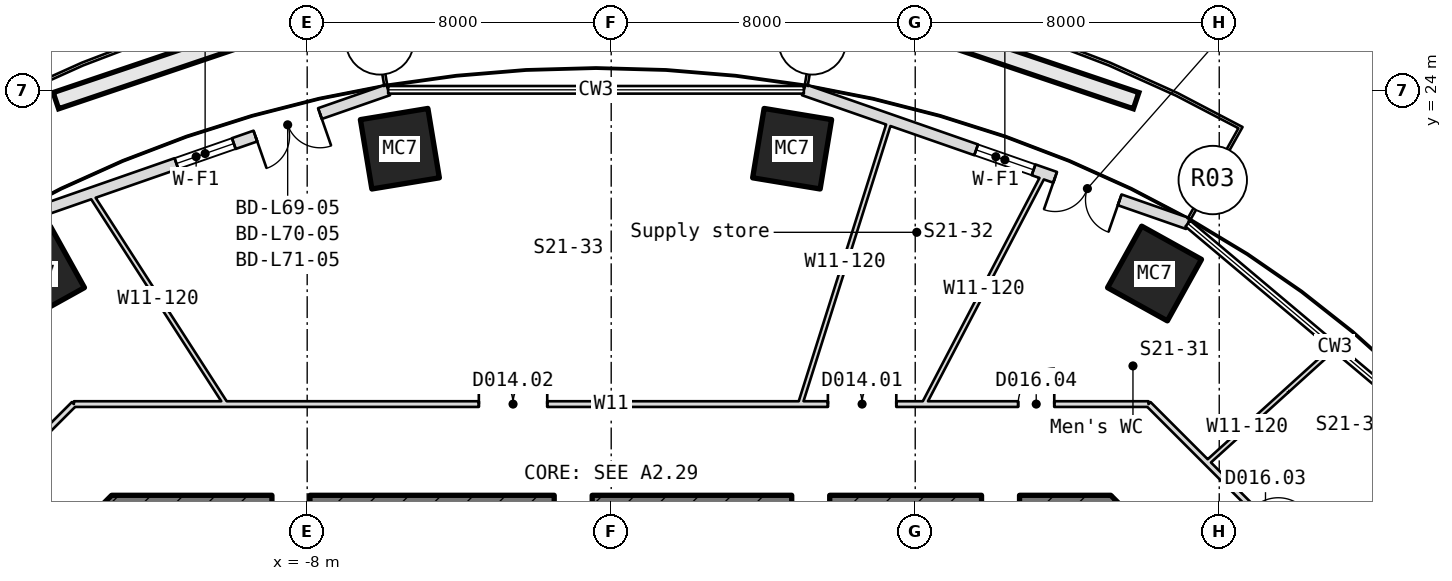
"""IFC4 building model, lengths in metres.
Left out: names, types, materials, properties, quantities, classifications, styles, units other than length and angle.
Written with IfcOpenShell. Run it as: python <this file> out.ifc"""

import sys

from ifc_helpers import new_model, si_unit, direction, frame, frame_2d, origin, origin_2d, place, context, subcontext, project, spatial, rectangle, hollow_rectangle, extrude, element, fill, save


model = new_model("IFC4")
c1 = context("Model", 3, precision=1e-05, world=origin(), true_north=direction((0.0, 1.0)))
c2 = subcontext(c1, "Body", "Model", "MODEL_VIEW")
j1 = project(units=[si_unit("LENGTHUNIT", "METRE"), si_unit("PLANEANGLEUNIT", "RADIAN")], contexts=[c1])
p1 = place(None, origin())
s1 = spatial("IfcSite", under=j1, at=p1, CompositionType="ELEMENT")
p2 = place(p1, origin())
s2 = spatial("IfcBuilding", under=s1, at=p2, CompositionType="ELEMENT")
p3 = place(p2, frame((0.0, 0.0, 309.4)))
s3 = spatial("IfcBuildingStorey", under=s2, at=p3, CompositionType="ELEMENT", Elevation=309.4)
for number, where, z_axis, x_axis in (
    (1, (14.297, 19.186, -0.18), (0.0, 0.0, 1.0), (0.874, -0.486, 0.0)),
    (2, (4.761, 22.469, -0.18), (0.0, 0.0, 1.0), (0.987, -0.163, 0.0)),
    (3, (-5.561, 22.469, -0.18), (0.0, 0.0, 1.0), (0.987, 0.163, 0.0)),
    (4, (-15.097, 19.186, -0.18), (0.0, 0.0, 1.0), (0.874, 0.486, 0.0)),
):
    element("IfcColumn", number, at=place(p3, frame(where, z_axis=z_axis, x_axis=x_axis)), inside=s3, PredefinedType="COLUMN", context=c2, shape_type="SweptSolid", body=[
        extrude(hollow_rectangle(XDim=1.8, YDim=1.85, WallThickness=0.06, at=origin_2d()), origin(), (0.0, 0.0, 1.0), 4.15),
    ])
p4 = place(p3, frame((15.175, 20.5, 0.0), z_axis=(0.0, 0.0, 1.0), x_axis=(-0.94436622093, 0.328895790132, 0.0)))
e5 = element("IfcWall", 5, at=p4, inside=s3, PredefinedType="SOLIDWALL", context=c2, shape_type="SweptSolid", body=[
    extrude(rectangle(XDim=10.701, YDim=0.3, at=frame_2d((5.351, 0.0))), origin(), (0.0, 0.0, 1.0), 3.97),
])
p5 = place(p4, frame((1.9, 0.0, 0.0)))
e6 = element("IfcOpeningElement", 6, at=p5, cuts=e5, PredefinedType="OPENING", context=c2, shape_type="SweptSolid", body=[
    extrude(rectangle(XDim=1.8, YDim=2.4, at=frame_2d((0.9, 1.2))), frame((0.0, 0.16, 0.0), z_axis=(0.0, -1.0, 0.0), x_axis=(1.0, 0.0, 0.0)), (0.0, 0.0, 1.0), 0.32),
])
p6 = place(p4, frame((4.3, 0.0, 0.9)))
e7 = element("IfcOpeningElement", 7, at=p6, cuts=e5, PredefinedType="OPENING", context=c2, shape_type="SweptSolid", body=[
    extrude(rectangle(XDim=1.6, YDim=1.5, at=frame_2d((0.8, 0.75))), frame((0.0, 0.16, 0.0), z_axis=(0.0, -1.0, 0.0), x_axis=(1.0, 0.0, 0.0)), (0.0, 0.0, 1.0), 0.32),
])
p7 = place(p3, frame((-5.869, 24.019, 0.0), z_axis=(0.0, 0.0, 1.0), x_axis=(-0.94436622093, -0.328895790132, 0.0)))
e8 = element("IfcWall", 8, at=p7, inside=s3, PredefinedType="SOLIDWALL", context=c2, shape_type="SweptSolid", body=[
    extrude(rectangle(XDim=10.701, YDim=0.3, at=frame_2d((5.351, 0.0))), origin(), (0.0, 0.0, 1.0), 3.97),
])
p8 = place(p7, frame((1.9, 0.0, 0.0)))
e9 = element("IfcOpeningElement", 9, at=p8, cuts=e8, PredefinedType="OPENING", context=c2, shape_type="SweptSolid", body=[
    extrude(rectangle(XDim=1.8, YDim=2.4, at=frame_2d((0.9, 1.2))), frame((0.0, 0.16, 0.0), z_axis=(0.0, -1.0, 0.0), x_axis=(1.0, 0.0, 0.0)), (0.0, 0.0, 1.0), 0.32),
])
p9 = place(p7, frame((4.3, 0.0, 0.9)))
e10 = element("IfcOpeningElement", 10, at=p9, cuts=e8, PredefinedType="OPENING", context=c2, shape_type="SweptSolid", body=[
    extrude(rectangle(XDim=1.6, YDim=1.5, at=frame_2d((0.8, 0.75))), frame((0.0, 0.16, 0.0), z_axis=(0.0, -1.0, 0.0), x_axis=(1.0, 0.0, 0.0)), (0.0, 0.0, 1.0), 0.32),
])
p10 = place(p3, frame((16.103, 9.897, -0.18), z_axis=(0.0, 0.0, 1.0), x_axis=(-0.707106781187, 0.707106781187, 0.0)))
e11 = element("IfcWall", 11, at=p10, inside=s3, PredefinedType="SHEAR", context=c2, shape_type="SweptSolid", body=[
    extrude(rectangle(XDim=4.533, YDim=0.7, at=frame_2d((2.266, 0.0))), origin(), (0.0, 0.0, 1.0), 4.15),
])
p11 = place(p3, frame((13.145, 13.0, -0.18), z_axis=(0.0, 0.0, 1.0), x_axis=(-1.0, 0.0, 0.0)))
e12 = element("IfcWall", 12, at=p11, inside=s3, PredefinedType="SHEAR", context=c2, shape_type="SweptSolid", body=[
    extrude(rectangle(XDim=26.29, YDim=0.7, at=frame_2d((13.145, 0.0))), origin(), (0.0, 0.0, 1.0), 4.15),
])
p12 = place(p11, frame((21.073, 0.0, 0.18)))
e13 = element("IfcOpeningElement", 13, at=p12, cuts=e12, PredefinedType="OPENING", context=c2, shape_type="SweptSolid", body=[
    extrude(rectangle(XDim=1.0, YDim=2.1, at=frame_2d((0.5, 1.05))), frame((0.0, 0.36, 0.0), z_axis=(0.0, -1.0, 0.0), x_axis=(1.0, 0.0, 0.0)), (0.0, 0.0, 1.0), 0.72),
])
p13 = place(p11, frame((13.645, 0.0, 0.18)))
e14 = element("IfcOpeningElement", 14, at=p13, cuts=e12, PredefinedType="OPENING", context=c2, shape_type="SweptSolid", body=[
    extrude(rectangle(XDim=1.0, YDim=2.1, at=frame_2d((0.5, 1.05))), frame((0.0, 0.36, 0.0), z_axis=(0.0, -1.0, 0.0), x_axis=(1.0, 0.0, 0.0)), (0.0, 0.0, 1.0), 0.72),
])
p14 = place(p11, frame((7.395, 0.0, 0.18)))
e15 = element("IfcOpeningElement", 15, at=p14, cuts=e12, PredefinedType="OPENING", context=c2, shape_type="SweptSolid", body=[
    extrude(rectangle(XDim=1.0, YDim=2.1, at=frame_2d((0.5, 1.05))), frame((0.0, 0.36, 0.0), z_axis=(0.0, -1.0, 0.0), x_axis=(1.0, 0.0, 0.0)), (0.0, 0.0, 1.0), 0.72),
])
p15 = place(p11, frame((2.4, 0.0, 0.18)))
e16 = element("IfcOpeningElement", 16, at=p15, cuts=e12, PredefinedType="OPENING", context=c2, shape_type="SweptSolid", body=[
    extrude(rectangle(XDim=1.0, YDim=2.1, at=frame_2d((0.5, 1.05))), frame((0.0, 0.36, 0.0), z_axis=(0.0, -1.0, 0.0), x_axis=(1.0, 0.0, 0.0)), (0.0, 0.0, 1.0), 0.72),
])
p16 = place(p3, frame((-12.897, 13.103, -0.18), z_axis=(0.0, 0.0, 1.0), x_axis=(-0.707106781187, -0.707106781187, 0.0)))
e17 = element("IfcWall", 17, at=p16, inside=s3, PredefinedType="SHEAR", context=c2, shape_type="SweptSolid", body=[
    extrude(rectangle(XDim=4.533, YDim=0.7, at=frame_2d((2.266, 0.0))), origin(), (0.0, 0.0, 1.0), 4.15),
])
p17 = place(p3, frame((-18.75, 11.139, 0.0), z_axis=(0.0, 0.0, 1.0), x_axis=(0.707106781187, 0.707106781187, 0.0)))
e18 = element("IfcWall", 18, at=p17, inside=s3, PredefinedType="PARTITIONING", context=c2, shape_type="SweptSolid", body=[
    extrude(rectangle(XDim=6.521, YDim=0.15, at=frame_2d((3.26, 0.0))), origin(), (0.0, 0.0, 1.0), 3.97),
])
p18 = place(p3, frame((-14.139, 15.75, 0.0), z_axis=(0.0, 0.0, 1.0), x_axis=(1.0, 0.0, 0.0)))
e19 = element("IfcWall", 19, at=p18, inside=s3, PredefinedType="PARTITIONING", context=c2, shape_type="SweptSolid", body=[
    extrude(rectangle(XDim=28.278, YDim=0.15, at=frame_2d((14.139, 0.0))), origin(), (0.0, 0.0, 1.0), 3.97),
])
p19 = place(p18, frame((24.848, 0.0, 0.0)))
e20 = element("IfcOpeningElement", 20, at=p19, cuts=e19, PredefinedType="OPENING", context=c2, shape_type="SweptSolid", body=[
    extrude(rectangle(XDim=0.95, YDim=2.1, at=frame_2d((0.475, 1.05))), frame((0.0, 0.085, 0.0), z_axis=(0.0, -1.0, 0.0), x_axis=(1.0, 0.0, 0.0)), (0.0, 0.0, 1.0), 0.17),
])
p20 = place(p18, frame((19.841, 0.0, 0.0)))
e21 = element("IfcOpeningElement", 21, at=p20, cuts=e19, PredefinedType="OPENING", context=c2, shape_type="SweptSolid", body=[
    extrude(rectangle(XDim=1.8, YDim=2.1, at=frame_2d((0.9, 1.05))), frame((0.0, 0.085, 0.0), z_axis=(0.0, -1.0, 0.0), x_axis=(1.0, 0.0, 0.0)), (0.0, 0.0, 1.0), 0.17),
])
p21 = place(p18, frame((10.656, 0.0, 0.0)))
e22 = element("IfcOpeningElement", 22, at=p21, cuts=e19, PredefinedType="OPENING", context=c2, shape_type="SweptSolid", body=[
    extrude(rectangle(XDim=1.8, YDim=2.1, at=frame_2d((0.9, 1.05))), frame((0.0, 0.085, 0.0), z_axis=(0.0, -1.0, 0.0), x_axis=(1.0, 0.0, 0.0)), (0.0, 0.0, 1.0), 0.17),
])
p22 = place(p3, frame((-10.141, 15.75, 0.0), z_axis=(0.0, 0.0, 1.0), x_axis=(-0.541399884667, 0.840765225781, 0.0)))
e23 = element("IfcWall", 23, at=p22, inside=s3, PredefinedType="PARTITIONING", context=c2, shape_type="SweptSolid", body=[
    extrude(rectangle(XDim=6.588, YDim=0.12, at=frame_2d((3.294, 0.0))), origin(), (0.0, 0.0, 1.0), 3.97),
])
p23 = place(p3, frame((4.974, 15.75, 0.0), z_axis=(0.0, 0.0, 1.0), x_axis=(0.301144774856, 0.953578431266, 0.0)))
e24 = element("IfcWall", 24, at=p23, inside=s3, PredefinedType="PARTITIONING", context=c2, shape_type="SweptSolid", body=[
    extrude(rectangle(XDim=7.844, YDim=0.12, at=frame_2d((3.922, 0.0))), origin(), (0.0, 0.0, 1.0), 3.97),
])
p24 = place(p3, frame((8.229, 15.75, 0.0), z_axis=(0.0, 0.0, 1.0), x_axis=(0.463069511272, 0.886321966178, 0.0)))
e25 = element("IfcWall", 25, at=p24, inside=s3, PredefinedType="PARTITIONING", context=c2, shape_type="SweptSolid", body=[
    extrude(rectangle(XDim=6.843, YDim=0.12, at=frame_2d((3.421, 0.0))), origin(), (0.0, 0.0, 1.0), 3.97),
])
p25 = place(p3, frame((14.139, 15.75, 0.0), z_axis=(0.0, 0.0, 1.0), x_axis=(0.707106781187, -0.707106781187, 0.0)))
e26 = element("IfcWall", 26, at=p25, inside=s3, PredefinedType="PARTITIONING", context=c2, shape_type="SweptSolid", body=[
    extrude(rectangle(XDim=6.521, YDim=0.15, at=frame_2d((3.26, 0.0))), origin(), (0.0, 0.0, 1.0), 3.97),
])
p26 = place(p25, frame((3.878, 0.0, 0.0)))
e27 = element("IfcOpeningElement", 27, at=p26, cuts=e26, PredefinedType="OPENING", context=c2, shape_type="SweptSolid", body=[
    extrude(rectangle(XDim=0.95, YDim=2.1, at=frame_2d((0.475, 1.05))), frame((0.0, 0.085, 0.0), z_axis=(0.0, -1.0, 0.0), x_axis=(1.0, 0.0, 0.0)), (0.0, 0.0, 1.0), 0.17),
])
p27 = place(p3, frame((15.684, 14.206, 0.0), z_axis=(0.0, 0.0, 1.0), x_axis=(0.741151165877, 0.671338178059, 0.0)))
e28 = element("IfcWall", 28, at=p27, inside=s3, PredefinedType="PARTITIONING", context=c2, shape_type="SweptSolid", body=[
    extrude(rectangle(XDim=2.843, YDim=0.12, at=frame_2d((1.421, 0.0))), origin(), (0.0, 0.0, 1.0), 3.668),
])
p28 = place(p3, frame((17.791, 16.114, 0.0), z_axis=(0.0, 0.0, 1.0), x_axis=(0.741097119871, 0.671397839525, 0.0)))
e29 = element("IfcWall", 29, at=p28, inside=s3, PredefinedType="PARTITIONING", context=c2, shape_type="SweptSolid", body=[
    extrude(rectangle(XDim=1.688, YDim=0.12, at=frame_2d((0.844, 0.0))), origin(), (0.0, 0.0, 1.0), 3.97),
])
p29 = place(p5, origin())
e30 = element("IfcDoor", 30, at=p29, inside=s3, OperationType="SINGLE_SWING_LEFT", PredefinedType="DOOR", context=c2, shape_type="SweptSolid", body=[
    extrude(rectangle(XDim=1.8, YDim=2.4, at=frame_2d((0.9, 1.2))), frame((0.0, 0.025, 0.0), z_axis=(0.0, -1.0, 0.0), x_axis=(1.0, 0.0, 0.0)), (0.0, 0.0, 1.0), 0.05),
])
fill(e6, e30)
p30 = place(p6, origin())
e31 = element("IfcWindow", 31, at=p30, inside=s3, PartitioningType="SINGLE_PANEL", PredefinedType="WINDOW", context=c2, shape_type="SweptSolid", body=[
    extrude(rectangle(XDim=1.6, YDim=1.5, at=frame_2d((0.8, 0.75))), frame((0.0, 0.03, 0.0), z_axis=(0.0, -1.0, 0.0), x_axis=(1.0, 0.0, 0.0)), (0.0, 0.0, 1.0), 0.06),
])
fill(e7, e31)
p31 = place(p8, origin())
e32 = element("IfcDoor", 32, at=p31, inside=s3, OperationType="SINGLE_SWING_LEFT", PredefinedType="DOOR", context=c2, shape_type="SweptSolid", body=[
    extrude(rectangle(XDim=1.8, YDim=2.4, at=frame_2d((0.9, 1.2))), frame((0.0, 0.025, 0.0), z_axis=(0.0, -1.0, 0.0), x_axis=(1.0, 0.0, 0.0)), (0.0, 0.0, 1.0), 0.05),
])
fill(e9, e32)
p32 = place(p9, origin())
e33 = element("IfcWindow", 33, at=p32, inside=s3, PartitioningType="SINGLE_PANEL", PredefinedType="WINDOW", context=c2, shape_type="SweptSolid", body=[
    extrude(rectangle(XDim=1.6, YDim=1.5, at=frame_2d((0.8, 0.75))), frame((0.0, 0.03, 0.0), z_axis=(0.0, -1.0, 0.0), x_axis=(1.0, 0.0, 0.0)), (0.0, 0.0, 1.0), 0.06),
])
fill(e10, e33)
p33 = place(p19, origin())
e34 = element("IfcDoor", 34, at=p33, inside=s3, OperationType="SINGLE_SWING_RIGHT", PredefinedType="DOOR", context=c2, shape_type="SweptSolid", body=[
    extrude(rectangle(XDim=0.95, YDim=2.1, at=frame_2d((0.475, 1.05))), frame((0.0, 0.025, 0.0), z_axis=(0.0, -1.0, 0.0), x_axis=(1.0, 0.0, 0.0)), (0.0, 0.0, 1.0), 0.05),
])
fill(e20, e34)
p34 = place(p20, origin())
e35 = element("IfcDoor", 35, at=p34, inside=s3, OperationType="DOUBLE_DOOR_SINGLE_SWING", PredefinedType="DOOR", context=c2, shape_type="SweptSolid", body=[
    extrude(rectangle(XDim=1.8, YDim=2.1, at=frame_2d((0.9, 1.05))), frame((0.0, 0.025, 0.0), z_axis=(0.0, -1.0, 0.0), x_axis=(1.0, 0.0, 0.0)), (0.0, 0.0, 1.0), 0.05),
])
fill(e21, e35)
p35 = place(p21, origin())
e36 = element("IfcDoor", 36, at=p35, inside=s3, OperationType="DOUBLE_DOOR_SINGLE_SWING", PredefinedType="DOOR", context=c2, shape_type="SweptSolid", body=[
    extrude(rectangle(XDim=1.8, YDim=2.1, at=frame_2d((0.9, 1.05))), frame((0.0, 0.025, 0.0), z_axis=(0.0, -1.0, 0.0), x_axis=(1.0, 0.0, 0.0)), (0.0, 0.0, 1.0), 0.05),
])
fill(e22, e36)
save(model, sys.argv[1])
